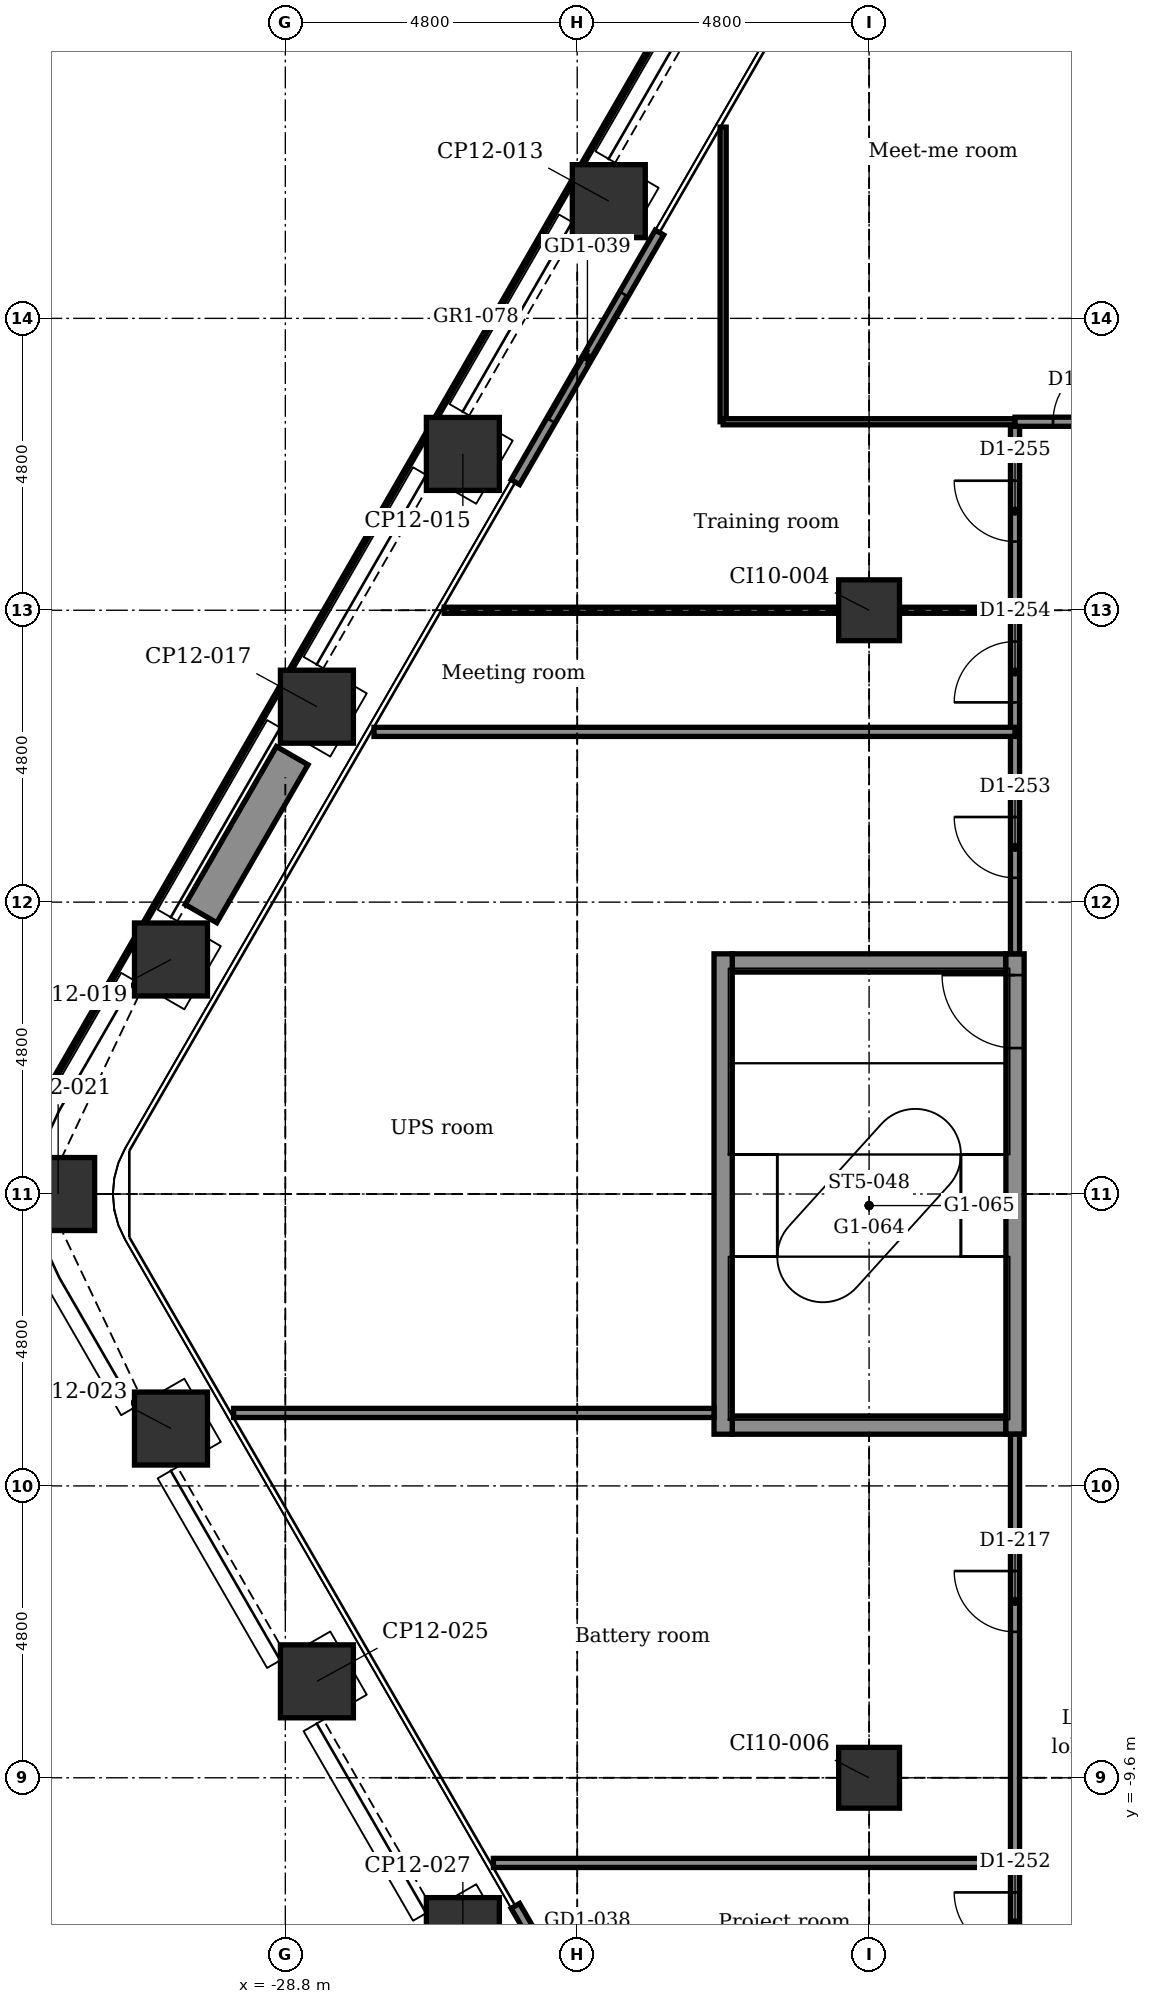
"""IFC4 building model, lengths in metres.
Left out: names, types, materials, properties, quantities, classifications, styles, units other than length and angle.
Written with IfcOpenShell. Run it as: python <this file> out.ifc"""

import sys

from ifc_helpers import new_model, si_unit, direction, frame, frame_2d, origin, origin_2d, place, context, subcontext, project, spatial, rectangle, extrude, element, fill, save


model = new_model("IFC4")
c1 = context("Model", 3, precision=1e-05, world=origin(), true_north=direction((0.0, 1.0)))
c2 = subcontext(c1, "Body", "Model", "MODEL_VIEW")
j1 = project(units=[si_unit("LENGTHUNIT", "METRE"), si_unit("PLANEANGLEUNIT", "RADIAN")], contexts=[c1])
p1 = place(None, origin())
s1 = spatial("IfcSite", under=j1, at=p1, CompositionType="ELEMENT")
p2 = place(p1, origin())
s2 = spatial("IfcBuilding", under=s1, at=p2, CompositionType="ELEMENT")
p3 = place(p2, frame((0.0, 0.0, 91.4)))
s3 = spatial("IfcBuildingStorey", under=s2, at=p3, CompositionType="ELEMENT", Elevation=91.4)
for number, where, z_axis, x_axis in (
    (1, (-25.88, -12.171, -0.2), (0.0, 0.0, 1.0), (0.866, 0.5, 0.0)),
    (2, (-28.28, -8.014, -0.2), (0.0, 0.0, 1.0), (0.866, 0.5, 0.0)),
    (3, (-30.68, -3.857, -0.2), (0.0, 0.0, 1.0), (0.866, 0.5, 0.0)),
    (4, (-32.536, 0.0, -0.2), (0.0, 0.0, 1.0), (1.0, 0.0, 0.0)),
    (5, (-30.68, 3.857, -0.2), (0.0, 0.0, 1.0), (0.5, 0.866, 0.0)),
    (6, (-28.28, 8.014, -0.2), (0.0, 0.0, 1.0), (0.5, 0.866, 0.0)),
    (7, (-25.88, 12.171, -0.2), (0.0, 0.0, 1.0), (0.5, 0.866, 0.0)),
    (8, (-23.48, 16.328, -0.2), (0.0, 0.0, 1.0), (0.5, 0.866, 0.0)),
):
    element("IfcColumn", number, at=place(p3, frame(where, z_axis=z_axis, x_axis=x_axis)), inside=s3, PredefinedType="COLUMN", context=c2, shape_type="SweptSolid", body=[
        extrude(rectangle(XDim=1.2, YDim=1.2, at=origin_2d()), origin(), (0.0, 0.0, 1.0), 4.5),
    ])
for number, where, z_axis, x_axis in (
    (9, (-19.2, -9.6, -0.2), (0.0, 0.0, 1.0), (1.0, 0.0, 0.0)),
    (10, (-19.2, 9.6, -0.2), (0.0, 0.0, 1.0), (1.0, 0.0, 0.0)),
):
    element("IfcColumn", number, at=place(p3, frame(where, z_axis=z_axis, x_axis=x_axis)), inside=s3, PredefinedType="COLUMN", context=c2, shape_type="SweptSolid", body=[
        extrude(rectangle(XDim=1.0, YDim=1.0, at=origin_2d()), origin(), (0.0, 0.0, 1.0), 4.5),
    ])
for number, where, z_axis, x_axis in (
    (11, (-21.45, -3.8, -0.2), (0.0, 0.0, 1.0), (1.0, 0.0, 0.0)),
    (12, (-21.45, 3.8, -0.2), (0.0, 0.0, 1.0), (1.0, 0.0, 0.0)),
):
    element("IfcWall", number, at=place(p3, frame(where, z_axis=z_axis, x_axis=x_axis)), inside=s3, PredefinedType="STANDARD", context=c2, shape_type="SweptSolid", body=[
        extrude(rectangle(XDim=4.5, YDim=0.3, at=frame_2d((2.25, 0.0))), origin(), (0.0, 0.0, 1.0), 4.5),
    ])
p4 = place(p3, frame((-21.6, -3.95, -0.2), z_axis=(0.0, 0.0, 1.0), x_axis=(0.0, 1.0, 0.0)))
e13 = element("IfcWall", 13, at=p4, inside=s3, PredefinedType="STANDARD", context=c2, shape_type="SweptSolid", body=[
    extrude(rectangle(XDim=7.9, YDim=0.3, at=frame_2d((3.95, 0.0))), origin(), (0.0, 0.0, 1.0), 4.5),
])
p5 = place(p3, frame((-16.8, -3.95, -0.2), z_axis=(0.0, 0.0, 1.0), x_axis=(0.0, 1.0, 0.0)))
e14 = element("IfcWall", 14, at=p5, inside=s3, PredefinedType="STANDARD", context=c2, shape_type="SweptSolid", body=[
    extrude(rectangle(XDim=7.9, YDim=0.3, at=frame_2d((3.95, 0.0))), origin(), (0.0, 0.0, 1.0), 4.5),
])
p6 = place(p5, frame((6.35, 0.0, 0.2)))
e15 = element("IfcOpeningElement", 15, at=p6, cuts=e14, PredefinedType="OPENING", context=c2, shape_type="SweptSolid", body=[
    extrude(rectangle(XDim=1.2, YDim=2.1, at=frame_2d((0.6, 1.05))), frame((0.0, 0.16, 0.0), z_axis=(0.0, -1.0, 0.0), x_axis=(1.0, 0.0, 0.0)), (0.0, 0.0, 1.0), 0.32),
])
p7 = place(p3, frame((-22.647, -15.812, 0.0), z_axis=(0.0, 0.0, 1.0), x_axis=(-0.499978080042, 0.866038058908, 0.0)))
e16 = element("IfcWall", 16, at=p7, inside=s3, PredefinedType="PARTITIONING", context=c2, shape_type="SweptSolid", body=[
    extrude(rectangle(XDim=4.74, YDim=0.16, at=frame_2d((2.37, 0.0))), origin(), (0.0, 0.0, 1.0), 4.3),
])
p8 = place(p7, frame((1.17, 0.0, 0.0)))
e17 = element("IfcOpeningElement", 17, at=p8, cuts=e16, PredefinedType="OPENING", context=c2, shape_type="SweptSolid", body=[
    extrude(rectangle(XDim=2.4, YDim=2.4, at=frame_2d((1.2, 1.2))), frame((0.0, 0.09, 0.0), z_axis=(0.0, -1.0, 0.0), x_axis=(1.0, 0.0, 0.0)), (0.0, 0.0, 1.0), 0.18),
])
p9 = place(p3, frame((-25.017, 11.707, 0.0), z_axis=(0.0, 0.0, 1.0), x_axis=(0.499978080042, 0.866038058908, 0.0)))
e18 = element("IfcWall", 18, at=p9, inside=s3, PredefinedType="PARTITIONING", context=c2, shape_type="SweptSolid", body=[
    extrude(rectangle(XDim=4.74, YDim=0.16, at=frame_2d((2.37, 0.0))), origin(), (0.0, 0.0, 1.0), 4.3),
])
p10 = place(p9, frame((1.17, 0.0, 0.0)))
e19 = element("IfcOpeningElement", 19, at=p10, cuts=e18, PredefinedType="OPENING", context=c2, shape_type="SweptSolid", body=[
    extrude(rectangle(XDim=2.4, YDim=2.4, at=frame_2d((1.2, 1.2))), frame((0.0, 0.09, 0.0), z_axis=(0.0, -1.0, 0.0), x_axis=(1.0, 0.0, 0.0)), (0.0, 0.0, 1.0), 0.18),
])
p11 = place(p3, frame((-30.187, 4.611, 0.0), z_axis=(0.0, 0.0, 1.0), x_axis=(0.499990139034, 0.866031096941, 0.0)))
e20 = element("IfcWall", 20, at=p11, inside=s3, PredefinedType="USERDEFINED", context=c2, shape_type="SweptSolid", body=[
    extrude(rectangle(XDim=3.0, YDim=0.6, at=frame_2d((1.5, 0.0))), origin(), (0.0, 0.0, 1.0), 0.7),
])
p12 = place(p3, frame((-16.8, -13.0, 0.0), z_axis=(0.0, 0.0, 1.0), x_axis=(0.0, 1.0, 0.0)))
e21 = element("IfcWall", 21, at=p12, inside=s3, PredefinedType="PARTITIONING", context=c2, shape_type="SweptSolid", body=[
    extrude(rectangle(XDim=9.05, YDim=0.15, at=frame_2d((4.525, 0.0))), origin(), (0.0, 0.0, 1.0), 4.3),
])
p13 = place(p12, frame((0.515, 0.0, 0.0)))
e22 = element("IfcOpeningElement", 22, at=p13, cuts=e21, PredefinedType="OPENING", context=c2, shape_type="SweptSolid", body=[
    extrude(rectangle(XDim=1.0, YDim=2.1, at=frame_2d((0.5, 1.05))), frame((0.0, 0.085, 0.0), z_axis=(0.0, -1.0, 0.0), x_axis=(1.0, 0.0, 0.0)), (0.0, 0.0, 1.0), 0.17),
])
p14 = place(p12, frame((5.8, 0.0, 0.0)))
e23 = element("IfcOpeningElement", 23, at=p14, cuts=e21, PredefinedType="OPENING", context=c2, shape_type="SweptSolid", body=[
    extrude(rectangle(XDim=1.0, YDim=2.1, at=frame_2d((0.5, 1.05))), frame((0.0, 0.085, 0.0), z_axis=(0.0, -1.0, 0.0), x_axis=(1.0, 0.0, 0.0)), (0.0, 0.0, 1.0), 0.17),
])
p15 = place(p3, frame((-16.8, 3.95, 0.0), z_axis=(0.0, 0.0, 1.0), x_axis=(0.0, 1.0, 0.0)))
e24 = element("IfcWall", 24, at=p15, inside=s3, PredefinedType="PARTITIONING", context=c2, shape_type="SweptSolid", body=[
    extrude(rectangle(XDim=8.75, YDim=0.15, at=frame_2d((4.375, 0.0))), origin(), (0.0, 0.0, 1.0), 4.3),
])
p16 = place(p15, frame((1.25, 0.0, 0.0)))
e25 = element("IfcOpeningElement", 25, at=p16, cuts=e24, PredefinedType="OPENING", context=c2, shape_type="SweptSolid", body=[
    extrude(rectangle(XDim=1.0, YDim=2.1, at=frame_2d((0.5, 1.05))), frame((0.0, 0.085, 0.0), z_axis=(0.0, -1.0, 0.0), x_axis=(1.0, 0.0, 0.0)), (0.0, 0.0, 1.0), 0.17),
])
p17 = place(p15, frame((4.135, 0.0, 0.0)))
e26 = element("IfcOpeningElement", 26, at=p17, cuts=e24, PredefinedType="OPENING", context=c2, shape_type="SweptSolid", body=[
    extrude(rectangle(XDim=1.0, YDim=2.1, at=frame_2d((0.5, 1.05))), frame((0.0, 0.085, 0.0), z_axis=(0.0, -1.0, 0.0), x_axis=(1.0, 0.0, 0.0)), (0.0, 0.0, 1.0), 0.17),
])
p18 = place(p15, frame((6.78, 0.0, 0.0)))
e27 = element("IfcOpeningElement", 27, at=p18, cuts=e24, PredefinedType="OPENING", context=c2, shape_type="SweptSolid", body=[
    extrude(rectangle(XDim=1.0, YDim=2.1, at=frame_2d((0.5, 1.05))), frame((0.0, 0.085, 0.0), z_axis=(0.0, -1.0, 0.0), x_axis=(1.0, 0.0, 0.0)), (0.0, 0.0, 1.0), 0.17),
])
p19 = place(p3, frame((-21.6, 12.7, 0.0), z_axis=(0.0, 0.0, 1.0), x_axis=(0.0, 1.0, 0.0)))
e28 = element("IfcWall", 28, at=p19, inside=s3, PredefinedType="PARTITIONING", context=c2, shape_type="SweptSolid", body=[
    extrude(rectangle(XDim=4.845, YDim=0.1, at=frame_2d((2.422, 0.0))), origin(), (0.0, 0.0, 1.0), 4.3),
])
p20 = place(p3, frame((-25.378, -11.0, 0.0), z_axis=(0.0, 0.0, 1.0), x_axis=(1.0, 0.0, 0.0)))
e29 = element("IfcWall", 29, at=p20, inside=s3, PredefinedType="PARTITIONING", context=c2, shape_type="SweptSolid", body=[
    extrude(rectangle(XDim=8.578, YDim=0.15, at=frame_2d((4.289, 0.0))), origin(), (0.0, 0.0, 1.0), 4.3),
])
p21 = place(p3, frame((-29.651, -3.6, 0.0), z_axis=(0.0, 0.0, 1.0), x_axis=(1.0, 0.0, 0.0)))
e30 = element("IfcWall", 30, at=p21, inside=s3, PredefinedType="PARTITIONING", context=c2, shape_type="SweptSolid", body=[
    extrude(rectangle(XDim=7.901, YDim=0.15, at=frame_2d((3.95, 0.0))), origin(), (0.0, 0.0, 1.0), 4.3),
])
p22 = place(p3, frame((-27.342, 7.6, 0.0), z_axis=(0.0, 0.0, 1.0), x_axis=(1.0, 0.0, 0.0)))
e31 = element("IfcWall", 31, at=p22, inside=s3, PredefinedType="PARTITIONING", context=c2, shape_type="SweptSolid", body=[
    extrude(rectangle(XDim=10.542, YDim=0.15, at=frame_2d((5.271, 0.0))), origin(), (0.0, 0.0, 1.0), 4.3),
])
p23 = place(p3, frame((-26.187, 9.6, 0.0), z_axis=(0.0, 0.0, 1.0), x_axis=(1.0, 0.0, 0.0)))
e32 = element("IfcWall", 32, at=p23, inside=s3, PredefinedType="PARTITIONING", context=c2, shape_type="SweptSolid", body=[
    extrude(rectangle(XDim=6.487, YDim=0.1, at=frame_2d((3.243, 0.0))), origin(), (0.0, 0.0, 1.0), 3.692),
])
p24 = place(p3, frame((-18.7, 9.6, 0.0), z_axis=(0.0, 0.0, 1.0), x_axis=(1.0, 0.0, 0.0)))
e33 = element("IfcWall", 33, at=p24, inside=s3, PredefinedType="PARTITIONING", context=c2, shape_type="SweptSolid", body=[
    extrude(rectangle(XDim=1.9, YDim=0.1, at=frame_2d((0.95, 0.0))), origin(), (0.0, 0.0, 1.0), 3.692),
])
p25 = place(p3, frame((-21.6, 12.7, 0.0), z_axis=(0.0, 0.0, 1.0), x_axis=(1.0, 0.0, 0.0)))
e34 = element("IfcWall", 34, at=p25, inside=s3, PredefinedType="PARTITIONING", context=c2, shape_type="SweptSolid", body=[
    extrude(rectangle(XDim=4.8, YDim=0.1, at=frame_2d((2.4, 0.0))), origin(), (0.0, 0.0, 1.0), 4.3),
])
p26 = place(p3, frame((-16.8, 12.7, 0.0), z_axis=(0.0, 0.0, 1.0), x_axis=(1.0, 0.0, 0.0)))
e35 = element("IfcWall", 35, at=p26, inside=s3, PredefinedType="PARTITIONING", context=c2, shape_type="SweptSolid", body=[
    extrude(rectangle(XDim=33.6, YDim=0.15, at=frame_2d((16.8, 0.0))), origin(), (0.0, 0.0, 1.0), 4.3),
])
p27 = place(p26, frame((0.625, 0.0, 0.0)))
e36 = element("IfcOpeningElement", 36, at=p27, cuts=e35, PredefinedType="OPENING", context=c2, shape_type="SweptSolid", body=[
    extrude(rectangle(XDim=1.0, YDim=2.1, at=frame_2d((0.5, 1.05))), frame((0.0, 0.085, 0.0), z_axis=(0.0, -1.0, 0.0), x_axis=(1.0, 0.0, 0.0)), (0.0, 0.0, 1.0), 0.17),
])
p28 = place(p26, frame((4.3, 0.0, 0.0)))
e37 = element("IfcOpeningElement", 37, at=p28, cuts=e35, PredefinedType="OPENING", context=c2, shape_type="SweptSolid", body=[
    extrude(rectangle(XDim=1.0, YDim=2.1, at=frame_2d((0.5, 1.05))), frame((0.0, 0.085, 0.0), z_axis=(0.0, -1.0, 0.0), x_axis=(1.0, 0.0, 0.0)), (0.0, 0.0, 1.0), 0.17),
])
p29 = place(p26, frame((10.3, 0.0, 0.0)))
e38 = element("IfcOpeningElement", 38, at=p29, cuts=e35, PredefinedType="OPENING", context=c2, shape_type="SweptSolid", body=[
    extrude(rectangle(XDim=1.0, YDim=2.1, at=frame_2d((0.5, 1.05))), frame((0.0, 0.085, 0.0), z_axis=(0.0, -1.0, 0.0), x_axis=(1.0, 0.0, 0.0)), (0.0, 0.0, 1.0), 0.17),
])
p30 = place(p26, frame((14.975, 0.0, 0.0)))
e39 = element("IfcOpeningElement", 39, at=p30, cuts=e35, PredefinedType="OPENING", context=c2, shape_type="SweptSolid", body=[
    extrude(rectangle(XDim=1.0, YDim=2.1, at=frame_2d((0.5, 1.05))), frame((0.0, 0.085, 0.0), z_axis=(0.0, -1.0, 0.0), x_axis=(1.0, 0.0, 0.0)), (0.0, 0.0, 1.0), 0.17),
])
p31 = place(p26, frame((18.7, 0.0, 0.0)))
e40 = element("IfcOpeningElement", 40, at=p31, cuts=e35, PredefinedType="OPENING", context=c2, shape_type="SweptSolid", body=[
    extrude(rectangle(XDim=1.0, YDim=2.1, at=frame_2d((0.5, 1.05))), frame((0.0, 0.085, 0.0), z_axis=(0.0, -1.0, 0.0), x_axis=(1.0, 0.0, 0.0)), (0.0, 0.0, 1.0), 0.17),
])
p32 = place(p26, frame((22.485, 0.0, 0.0)))
e41 = element("IfcOpeningElement", 41, at=p32, cuts=e35, PredefinedType="OPENING", context=c2, shape_type="SweptSolid", body=[
    extrude(rectangle(XDim=1.0, YDim=2.1, at=frame_2d((0.5, 1.05))), frame((0.0, 0.085, 0.0), z_axis=(0.0, -1.0, 0.0), x_axis=(1.0, 0.0, 0.0)), (0.0, 0.0, 1.0), 0.17),
])
p33 = place(p26, frame((30.75, 0.0, 0.0)))
e42 = element("IfcOpeningElement", 42, at=p33, cuts=e35, PredefinedType="OPENING", context=c2, shape_type="SweptSolid", body=[
    extrude(rectangle(XDim=0.9, YDim=2.1, at=frame_2d((0.45, 1.05))), frame((0.0, 0.085, 0.0), z_axis=(0.0, -1.0, 0.0), x_axis=(1.0, 0.0, 0.0)), (0.0, 0.0, 1.0), 0.17),
])
p34 = place(p26, frame((27.75, 0.0, 0.0)))
e43 = element("IfcOpeningElement", 43, at=p34, cuts=e35, PredefinedType="OPENING", context=c2, shape_type="SweptSolid", body=[
    extrude(rectangle(XDim=0.9, YDim=2.1, at=frame_2d((0.45, 1.05))), frame((0.0, 0.085, 0.0), z_axis=(0.0, -1.0, 0.0), x_axis=(1.0, 0.0, 0.0)), (0.0, 0.0, 1.0), 0.17),
])
p35 = place(p10, origin())
e44 = element("IfcDoor", 44, at=p35, inside=s3, OperationType="DOUBLE_DOOR_SLIDING", PredefinedType="DOOR", context=c2, shape_type="SweptSolid", body=[
    extrude(rectangle(XDim=2.4, YDim=2.4, at=frame_2d((1.2, 1.2))), frame((0.0, 0.025, 0.0), z_axis=(0.0, -1.0, 0.0), x_axis=(1.0, 0.0, 0.0)), (0.0, 0.0, 1.0), 0.05),
])
fill(e19, e44)
p36 = place(p27, origin())
e45 = element("IfcDoor", 45, at=p36, inside=s3, OperationType="SINGLE_SWING_RIGHT", PredefinedType="DOOR", context=c2, shape_type="SweptSolid", body=[
    extrude(rectangle(XDim=1.0, YDim=2.1, at=frame_2d((0.5, 1.05))), frame((0.0, 0.025, 0.0), z_axis=(0.0, -1.0, 0.0), x_axis=(1.0, 0.0, 0.0)), (0.0, 0.0, 1.0), 0.05),
])
fill(e36, e45)
p37 = place(p13, origin())
e46 = element("IfcDoor", 46, at=p37, inside=s3, OperationType="SINGLE_SWING_RIGHT", PredefinedType="DOOR", context=c2, shape_type="SweptSolid", body=[
    extrude(rectangle(XDim=1.0, YDim=2.1, at=frame_2d((0.5, 1.05))), frame((0.0, 0.025, 0.0), z_axis=(0.0, -1.0, 0.0), x_axis=(1.0, 0.0, 0.0)), (0.0, 0.0, 1.0), 0.05),
])
fill(e22, e46)
p38 = place(p14, origin())
e47 = element("IfcDoor", 47, at=p38, inside=s3, OperationType="SINGLE_SWING_RIGHT", PredefinedType="DOOR", context=c2, shape_type="SweptSolid", body=[
    extrude(rectangle(XDim=1.0, YDim=2.1, at=frame_2d((0.5, 1.05))), frame((0.0, 0.025, 0.0), z_axis=(0.0, -1.0, 0.0), x_axis=(1.0, 0.0, 0.0)), (0.0, 0.0, 1.0), 0.05),
])
fill(e23, e47)
p39 = place(p16, origin())
e48 = element("IfcDoor", 48, at=p39, inside=s3, OperationType="SINGLE_SWING_RIGHT", PredefinedType="DOOR", context=c2, shape_type="SweptSolid", body=[
    extrude(rectangle(XDim=1.0, YDim=2.1, at=frame_2d((0.5, 1.05))), frame((0.0, 0.025, 0.0), z_axis=(0.0, -1.0, 0.0), x_axis=(1.0, 0.0, 0.0)), (0.0, 0.0, 1.0), 0.05),
])
fill(e25, e48)
p40 = place(p17, origin())
e49 = element("IfcDoor", 49, at=p40, inside=s3, OperationType="SINGLE_SWING_LEFT", PredefinedType="DOOR", context=c2, shape_type="SweptSolid", body=[
    extrude(rectangle(XDim=1.0, YDim=2.1, at=frame_2d((0.5, 1.05))), frame((0.0, 0.025, 0.0), z_axis=(0.0, -1.0, 0.0), x_axis=(1.0, 0.0, 0.0)), (0.0, 0.0, 1.0), 0.05),
])
fill(e26, e49)
p41 = place(p18, origin())
e50 = element("IfcDoor", 50, at=p41, inside=s3, OperationType="SINGLE_SWING_RIGHT", PredefinedType="DOOR", context=c2, shape_type="SweptSolid", body=[
    extrude(rectangle(XDim=1.0, YDim=2.1, at=frame_2d((0.5, 1.05))), frame((0.0, 0.025, 0.0), z_axis=(0.0, -1.0, 0.0), x_axis=(1.0, 0.0, 0.0)), (0.0, 0.0, 1.0), 0.05),
])
fill(e27, e50)
p42 = place(p6, origin())
e51 = element("IfcDoor", 51, at=p42, inside=s3, OperationType="SINGLE_SWING_RIGHT", PredefinedType="DOOR", context=c2, shape_type="SweptSolid", body=[
    extrude(rectangle(XDim=1.2, YDim=2.1, at=frame_2d((0.6, 1.05))), frame((0.0, 0.025, 0.0), z_axis=(0.0, -1.0, 0.0), x_axis=(1.0, 0.0, 0.0)), (0.0, 0.0, 1.0), 0.05),
])
fill(e15, e51)
save(model, sys.argv[1])
